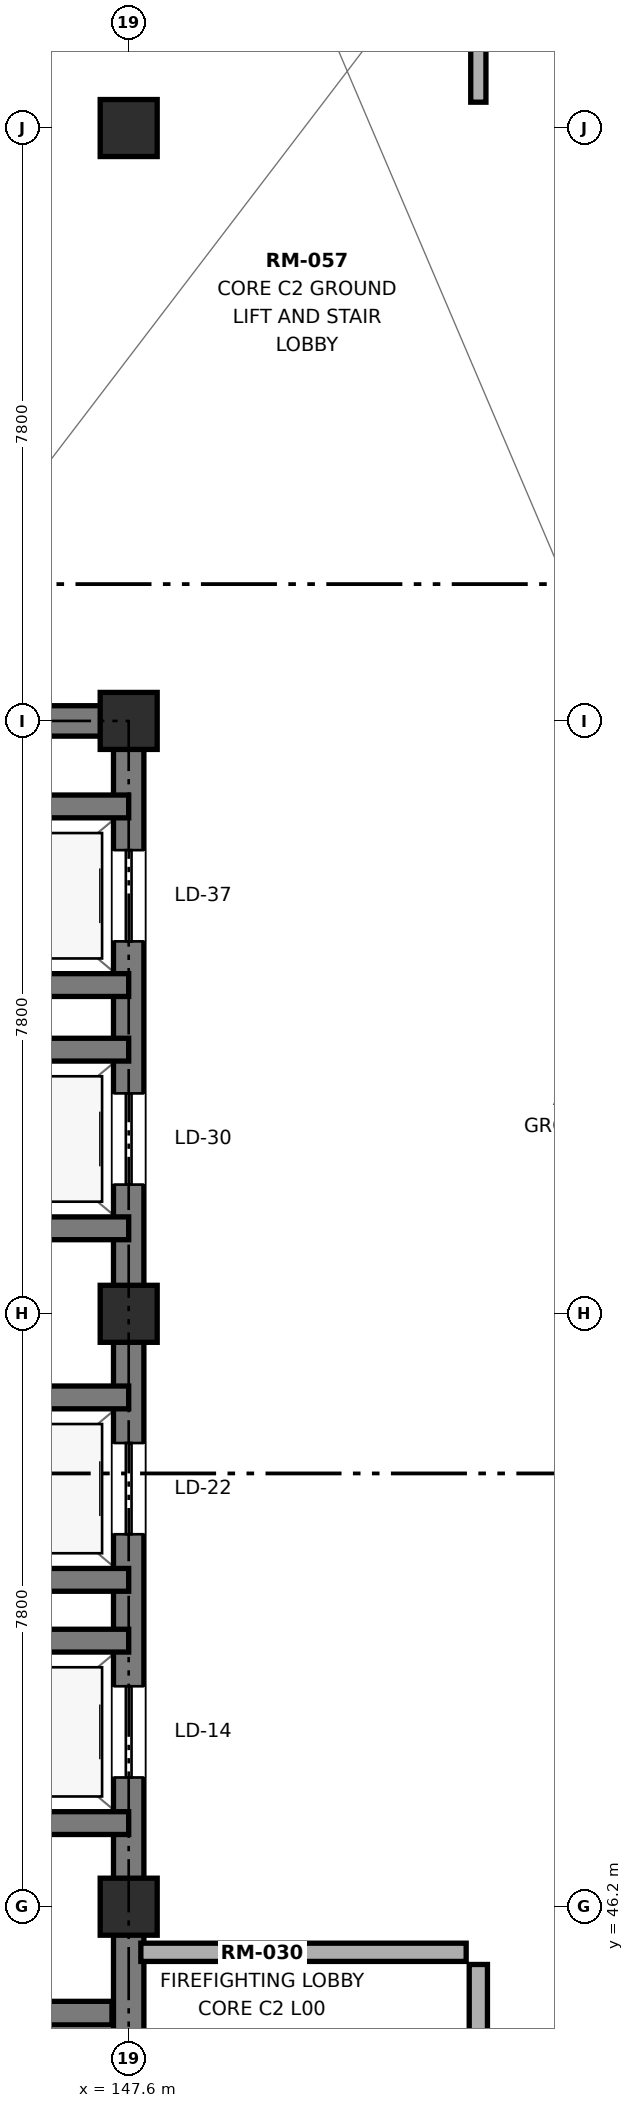
"""IFC4 building model, lengths in metres.
Left out: names, types, materials, properties, quantities, classifications, styles, units other than length and angle.
Written with IfcOpenShell. Run it as: python <this file> out.ifc"""

import sys

from ifc_helpers import new_model, si_unit, direction, frame, frame_2d, origin, origin_2d, place, context, subcontext, project, spatial, rectangle, extrude, element, fill, save


model = new_model("IFC4")
c1 = context("Model", 3, precision=1e-05, world=origin(), true_north=direction((0.0, 1.0)))
c2 = subcontext(c1, "Body", "Model", "MODEL_VIEW")
j1 = project(units=[si_unit("LENGTHUNIT", "METRE"), si_unit("PLANEANGLEUNIT", "RADIAN")], contexts=[c1])
p1 = place(None, origin())
s1 = spatial("IfcSite", under=j1, at=p1, CompositionType="ELEMENT")
p2 = place(p1, origin())
s2 = spatial("IfcBuilding", under=s1, at=p2, CompositionType="ELEMENT")
p3 = place(p2, origin())
s3 = spatial("IfcBuildingStorey", under=s2, at=p3, CompositionType="ELEMENT", Elevation=0.0)
for number, where, z_axis, x_axis in (
    (1, (147.6, 46.2, 0.0), (0.0, 0.0, 1.0), (1.0, 0.0, 0.0)),
    (2, (147.6, 54.0, 0.0), (0.0, 0.0, 1.0), (1.0, 0.0, 0.0)),
    (3, (147.6, 61.8, 0.0), (0.0, 0.0, 1.0), (1.0, 0.0, 0.0)),
    (4, (147.6, 69.6, 0.0), (0.0, 0.0, 1.0), (1.0, 0.0, 0.0)),
):
    element("IfcColumn", number, at=place(p3, frame(where, z_axis=z_axis, x_axis=x_axis)), inside=s3, PredefinedType="COLUMN", context=c2, shape_type="SweptSolid", body=[
        extrude(rectangle(XDim=0.75, YDim=0.75, at=origin_2d()), origin(), (0.0, 0.0, 1.0), 5.4),
    ])
p4 = place(p3, frame((137.8, 61.8, 0.0), z_axis=(0.0, 0.0, 1.0), x_axis=(1.0, 0.0, 0.0)))
e5 = element("IfcWall", 5, at=p4, inside=s3, PredefinedType="SHEAR", context=c2, shape_type="SweptSolid", body=[
    extrude(rectangle(XDim=10.0, YDim=0.4, at=frame_2d((5.0, 0.0))), origin(), (0.0, 0.0, 1.0), 5.4),
])
p5 = place(p3, frame((147.6, 38.6, 0.0), z_axis=(0.0, 0.0, 1.0), x_axis=(0.0, 1.0, 0.0)))
e6 = element("IfcWall", 6, at=p5, inside=s3, PredefinedType="SHEAR", context=c2, shape_type="SweptSolid", body=[
    extrude(rectangle(XDim=23.0, YDim=0.4, at=frame_2d((11.5, 0.0))), origin(), (0.0, 0.0, 1.0), 5.4),
])
p6 = place(p5, frame((9.3, 0.0, 0.0)))
e7 = element("IfcOpeningElement", 7, at=p6, cuts=e6, PredefinedType="OPENING", context=c2, shape_type="SweptSolid", body=[
    extrude(rectangle(XDim=1.2, YDim=2.2, at=frame_2d((0.6, 1.1))), frame((0.0, 0.21, 0.0), z_axis=(0.0, -1.0, 0.0), x_axis=(1.0, 0.0, 0.0)), (0.0, 0.0, 1.0), 0.42),
])
p7 = place(p5, frame((12.5, 0.0, 0.0)))
e8 = element("IfcOpeningElement", 8, at=p7, cuts=e6, PredefinedType="OPENING", context=c2, shape_type="SweptSolid", body=[
    extrude(rectangle(XDim=1.2, YDim=2.2, at=frame_2d((0.6, 1.1))), frame((0.0, 0.21, 0.0), z_axis=(0.0, -1.0, 0.0), x_axis=(1.0, 0.0, 0.0)), (0.0, 0.0, 1.0), 0.42),
])
p8 = place(p5, frame((17.1, 0.0, 0.0)))
e9 = element("IfcOpeningElement", 9, at=p8, cuts=e6, PredefinedType="OPENING", context=c2, shape_type="SweptSolid", body=[
    extrude(rectangle(XDim=1.2, YDim=2.2, at=frame_2d((0.6, 1.1))), frame((0.0, 0.21, 0.0), z_axis=(0.0, -1.0, 0.0), x_axis=(1.0, 0.0, 0.0)), (0.0, 0.0, 1.0), 0.42),
])
p9 = place(p5, frame((20.3, 0.0, 0.0)))
e10 = element("IfcOpeningElement", 10, at=p9, cuts=e6, PredefinedType="OPENING", context=c2, shape_type="SweptSolid", body=[
    extrude(rectangle(XDim=1.2, YDim=2.2, at=frame_2d((0.6, 1.1))), frame((0.0, 0.21, 0.0), z_axis=(0.0, -1.0, 0.0), x_axis=(1.0, 0.0, 0.0)), (0.0, 0.0, 1.0), 0.42),
])
p10 = place(p5, frame((2.4, 0.0, 0.0)))
e11 = element("IfcOpeningElement", 11, at=p10, cuts=e6, PredefinedType="OPENING", context=c2, shape_type="SweptSolid", body=[
    extrude(rectangle(XDim=1.1, YDim=2.2, at=frame_2d((0.55, 1.1))), frame((0.0, 0.21, 0.0), z_axis=(0.0, -1.0, 0.0), x_axis=(1.0, 0.0, 0.0)), (0.0, 0.0, 1.0), 0.42),
])
p11 = place(p3, frame((138.22, 44.8, 0.0), z_axis=(0.0, 0.0, 1.0), x_axis=(1.0, 0.0, 0.0)))
e12 = element("IfcWall", 12, at=p11, inside=s3, PredefinedType="SHEAR", context=c2, shape_type="SweptSolid", body=[
    extrude(rectangle(XDim=9.16, YDim=0.31, at=frame_2d((4.58, 0.0))), origin(), (0.0, 0.0, 1.0), 5.4),
])
for number, where, z_axis, x_axis in (
    (13, (144.75, 47.3, 0.0), (0.0, 0.0, 1.0), (1.0, 0.0, 0.0)),
    (14, (144.75, 49.7, 0.0), (0.0, 0.0, 1.0), (1.0, 0.0, 0.0)),
    (15, (144.75, 50.5, 0.0), (0.0, 0.0, 1.0), (1.0, 0.0, 0.0)),
    (16, (144.75, 52.9, 0.0), (0.0, 0.0, 1.0), (1.0, 0.0, 0.0)),
):
    element("IfcWall", number, at=place(p3, frame(where, z_axis=z_axis, x_axis=x_axis)), inside=s3, PredefinedType="SHEAR", context=c2, shape_type="SweptSolid", body=[
        extrude(rectangle(XDim=2.85, YDim=0.3, at=frame_2d((1.425, 0.0))), origin(), (0.0, 0.0, 1.0), 5.4),
    ])
for number, where, z_axis, x_axis in (
    (17, (144.8, 55.125, 0.0), (0.0, 0.0, 1.0), (1.0, 0.0, 0.0)),
    (18, (144.8, 57.475, 0.0), (0.0, 0.0, 1.0), (1.0, 0.0, 0.0)),
    (19, (144.8, 58.325, 0.0), (0.0, 0.0, 1.0), (1.0, 0.0, 0.0)),
    (20, (144.8, 60.675, 0.0), (0.0, 0.0, 1.0), (1.0, 0.0, 0.0)),
):
    element("IfcWall", number, at=place(p3, frame(where, z_axis=z_axis, x_axis=x_axis)), inside=s3, PredefinedType="SHEAR", context=c2, shape_type="SweptSolid", body=[
        extrude(rectangle(XDim=2.8, YDim=0.3, at=frame_2d((1.4, 0.0))), origin(), (0.0, 0.0, 1.0), 5.4),
    ])
p12 = place(p3, frame((147.76, 45.6, 0.0), z_axis=(0.0, 0.0, 1.0), x_axis=(1.0, 0.0, 0.0)))
e21 = element("IfcWall", 21, at=p12, inside=s3, PredefinedType="PARTITIONING", context=c2, shape_type="SweptSolid", body=[
    extrude(rectangle(XDim=4.28, YDim=0.24, at=frame_2d((2.14, 0.0))), origin(), (0.0, 0.0, 1.0), 5.09),
])
p13 = place(p3, frame((152.2, 38.56, 0.0), z_axis=(0.0, 0.0, 1.0), x_axis=(0.0, 1.0, 0.0)))
e22 = element("IfcWall", 22, at=p13, inside=s3, PredefinedType="PARTITIONING", context=c2, shape_type="SweptSolid", body=[
    extrude(rectangle(XDim=6.88, YDim=0.24, at=frame_2d((3.44, 0.0))), origin(), (0.0, 0.0, 1.0), 5.09),
])
p14 = place(p13, frame((1.9, 0.0, 0.0)))
e23 = element("IfcOpeningElement", 23, at=p14, cuts=e22, PredefinedType="OPENING", context=c2, shape_type="SweptSolid", body=[
    extrude(rectangle(XDim=1.8, YDim=2.3, at=frame_2d((0.9, 1.15))), frame((0.0, 0.13, 0.0), z_axis=(0.0, -1.0, 0.0), x_axis=(1.0, 0.0, 0.0)), (0.0, 0.0, 1.0), 0.26),
])
p15 = place(p3, frame((152.2, 69.94, 0.0), z_axis=(0.0, 0.0, 1.0), x_axis=(0.0, 1.0, 0.0)))
e24 = element("IfcWall", 24, at=p15, inside=s3, PredefinedType="PARTITIONING", context=c2, shape_type="SweptSolid", body=[
    extrude(rectangle(XDim=29.28, YDim=0.2, at=frame_2d((14.64, 0.0))), origin(), (0.0, 0.0, 1.0), 5.09),
])
p16 = place(p15, frame((3.5, 0.0, 0.0)))
e25 = element("IfcOpeningElement", 25, at=p16, cuts=e24, PredefinedType="OPENING", context=c2, shape_type="SweptSolid", body=[
    extrude(rectangle(XDim=1.02, YDim=2.18, at=frame_2d((0.51, 1.09))), frame((0.0, 0.11, 0.0), z_axis=(0.0, -1.0, 0.0), x_axis=(1.0, 0.0, 0.0)), (0.0, 0.0, 1.0), 0.22),
])
p17 = place(p15, frame((12.5, 0.0, 0.0)))
e26 = element("IfcOpeningElement", 26, at=p17, cuts=e24, PredefinedType="OPENING", context=c2, shape_type="SweptSolid", body=[
    extrude(rectangle(XDim=0.95, YDim=2.15, at=frame_2d((0.475, 1.075))), frame((0.0, 0.11, 0.0), z_axis=(0.0, -1.0, 0.0), x_axis=(1.0, 0.0, 0.0)), (0.0, 0.0, 1.0), 0.22),
])
p18 = place(p15, frame((21.5, 0.0, 0.0)))
e27 = element("IfcOpeningElement", 27, at=p18, cuts=e24, PredefinedType="OPENING", context=c2, shape_type="SweptSolid", body=[
    extrude(rectangle(XDim=0.95, YDim=2.15, at=frame_2d((0.475, 1.075))), frame((0.0, 0.11, 0.0), z_axis=(0.0, -1.0, 0.0), x_axis=(1.0, 0.0, 0.0)), (0.0, 0.0, 1.0), 0.22),
])
p19 = place(p6, origin())
e28 = element("IfcDoor", 28, at=p19, inside=s3, OperationType="SLIDING_TO_RIGHT", PredefinedType="DOOR", context=c2, shape_type="SweptSolid", body=[
    extrude(rectangle(XDim=1.2, YDim=2.2, at=frame_2d((0.6, 1.1))), frame((0.0, 0.025, 0.0), z_axis=(0.0, -1.0, 0.0), x_axis=(1.0, 0.0, 0.0)), (0.0, 0.0, 1.0), 0.05),
])
fill(e7, e28)
p20 = place(p7, origin())
e29 = element("IfcDoor", 29, at=p20, inside=s3, OperationType="SLIDING_TO_RIGHT", PredefinedType="DOOR", context=c2, shape_type="SweptSolid", body=[
    extrude(rectangle(XDim=1.2, YDim=2.2, at=frame_2d((0.6, 1.1))), frame((0.0, 0.025, 0.0), z_axis=(0.0, -1.0, 0.0), x_axis=(1.0, 0.0, 0.0)), (0.0, 0.0, 1.0), 0.05),
])
fill(e8, e29)
p21 = place(p8, origin())
e30 = element("IfcDoor", 30, at=p21, inside=s3, OperationType="SLIDING_TO_RIGHT", PredefinedType="DOOR", context=c2, shape_type="SweptSolid", body=[
    extrude(rectangle(XDim=1.2, YDim=2.2, at=frame_2d((0.6, 1.1))), frame((0.0, 0.025, 0.0), z_axis=(0.0, -1.0, 0.0), x_axis=(1.0, 0.0, 0.0)), (0.0, 0.0, 1.0), 0.05),
])
fill(e9, e30)
p22 = place(p9, origin())
e31 = element("IfcDoor", 31, at=p22, inside=s3, OperationType="SLIDING_TO_LEFT", PredefinedType="DOOR", context=c2, shape_type="SweptSolid", body=[
    extrude(rectangle(XDim=1.2, YDim=2.2, at=frame_2d((0.6, 1.1))), frame((0.0, 0.025, 0.0), z_axis=(0.0, -1.0, 0.0), x_axis=(1.0, 0.0, 0.0)), (0.0, 0.0, 1.0), 0.05),
])
fill(e10, e31)
save(model, sys.argv[1])
